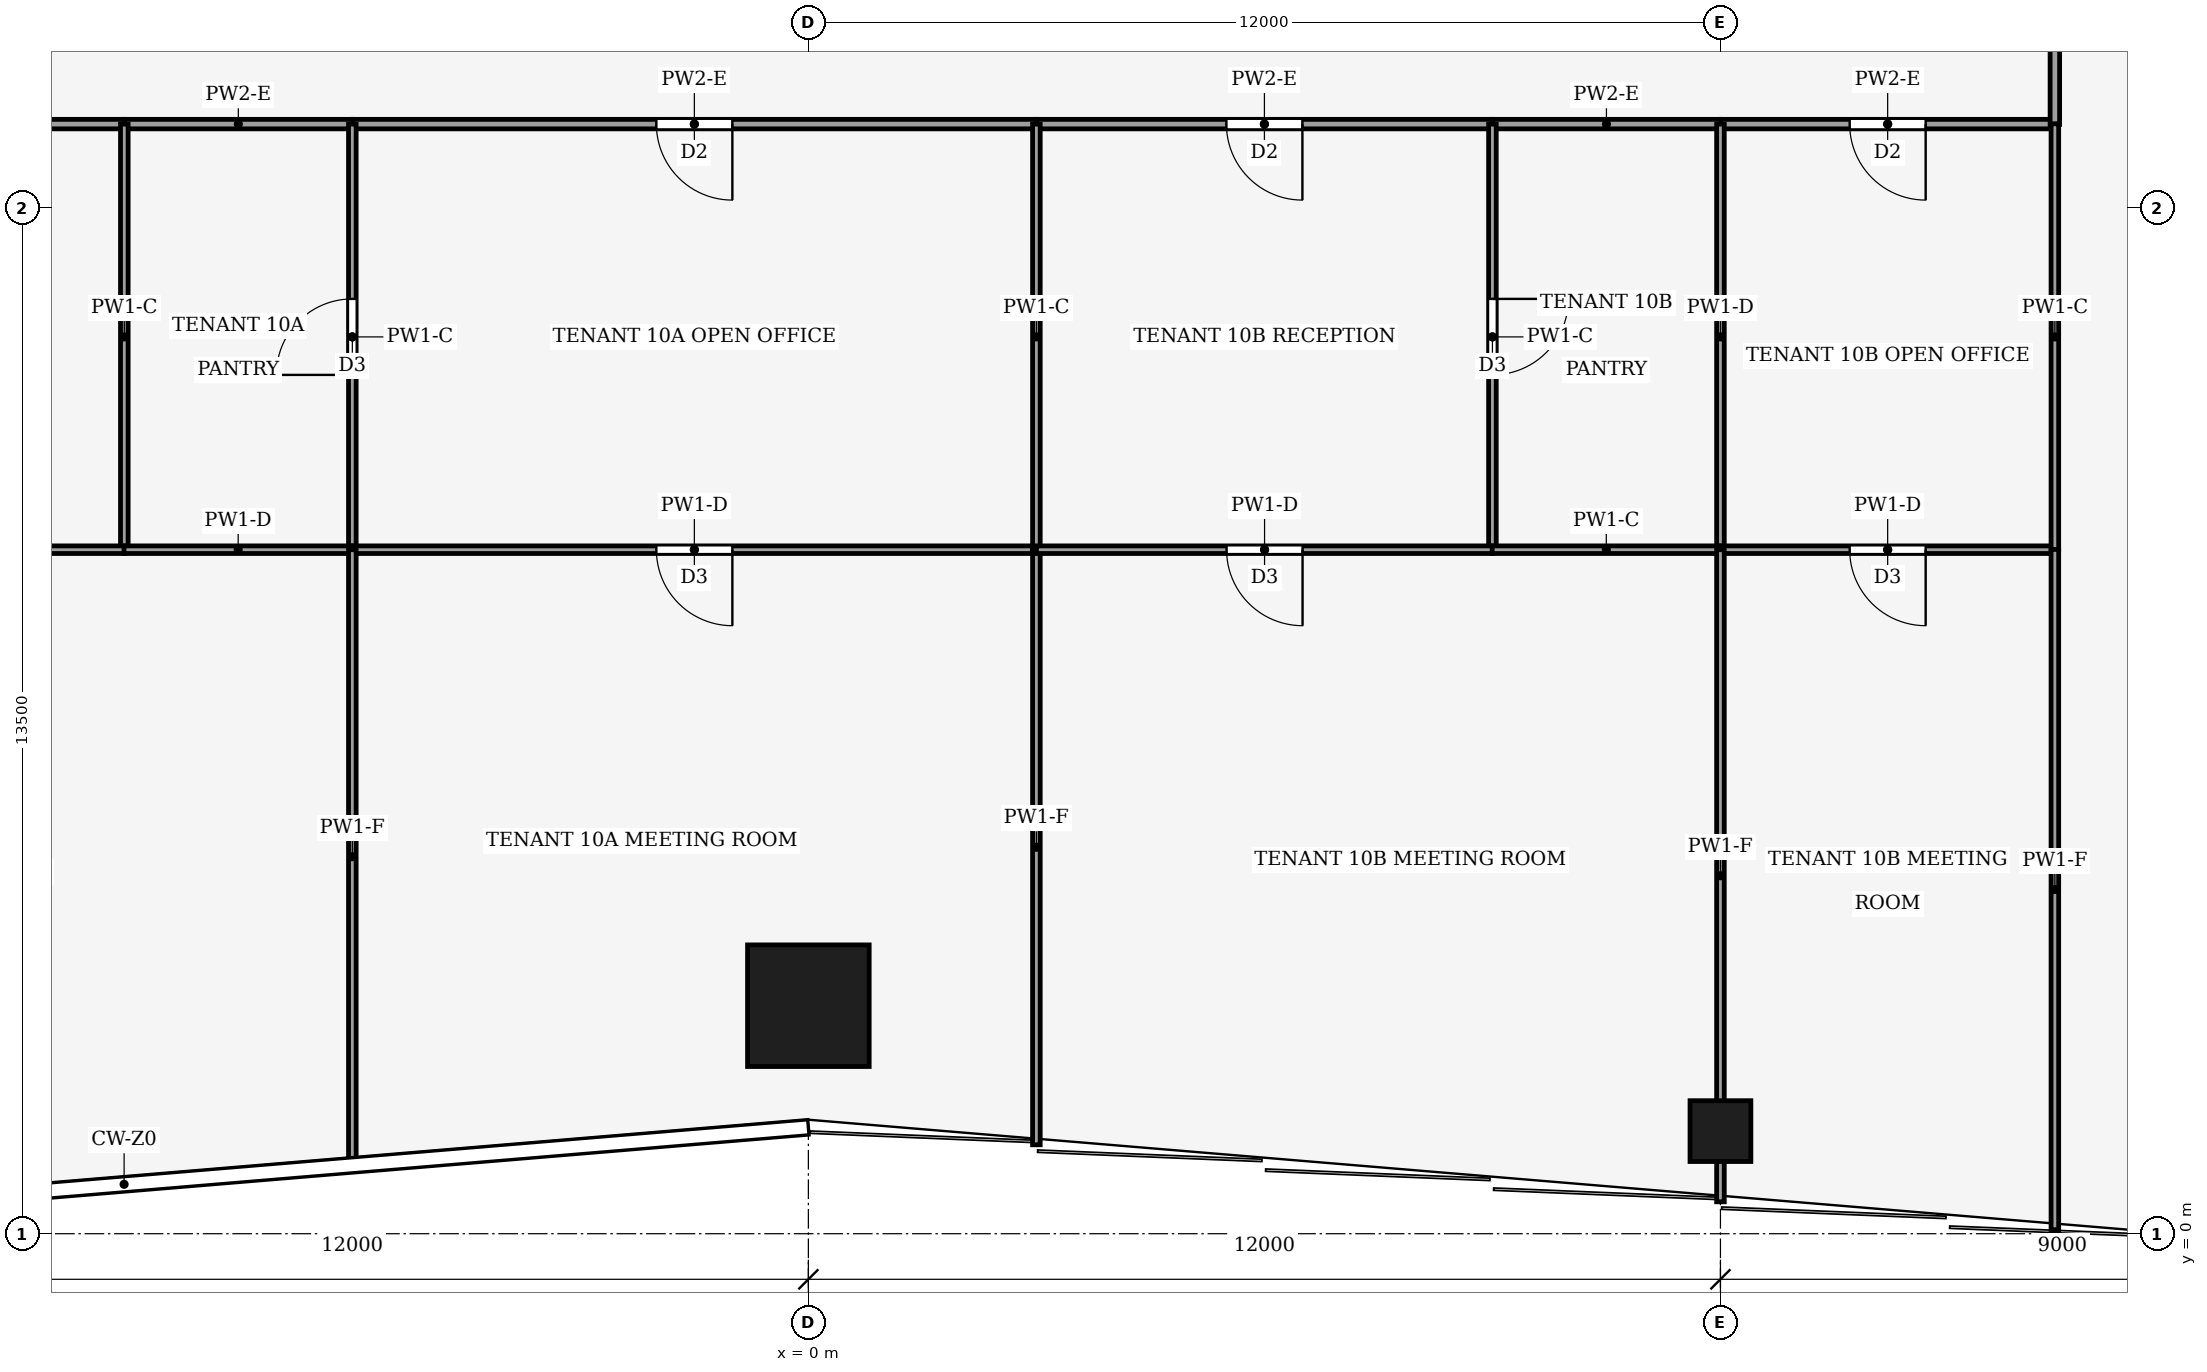
"""IFC4 building model, lengths in metres.
Left out: names, types, materials, properties, quantities, classifications, styles, units other than length and angle.
Written with IfcOpenShell. Run it as: python <this file> out.ifc"""

import sys

from ifc_helpers import new_model, si_unit, direction, frame, frame_2d, origin, origin_2d, place, context, subcontext, project, spatial, rectangle, hollow_rectangle, extrude, element, fill, save


model = new_model("IFC4")
c1 = context("Model", 3, precision=1e-05, world=origin(), true_north=direction((0.0, 1.0)))
c2 = subcontext(c1, "Body", "Model", "MODEL_VIEW")
j1 = project(units=[si_unit("LENGTHUNIT", "METRE"), si_unit("PLANEANGLEUNIT", "RADIAN")], contexts=[c1])
p1 = place(None, origin())
s1 = spatial("IfcSite", under=j1, at=p1, CompositionType="ELEMENT")
p2 = place(p1, origin())
s2 = spatial("IfcBuilding", under=s1, at=p2, CompositionType="ELEMENT")
p3 = place(p2, frame((0.0, 0.0, 46.0)))
s3 = spatial("IfcBuildingStorey", under=s2, at=p3, CompositionType="ELEMENT", Elevation=46.0)
p4 = place(p3, frame((0.0, 3.0, 0.0), z_axis=(0.0, 0.0, 1.0), x_axis=(1.0, 0.0, 0.0)))
e1 = element("IfcColumn", 1, at=p4, inside=s3, PredefinedType="COLUMN", context=c2, shape_type="SweptSolid", body=[
    extrude(hollow_rectangle(XDim=1.6, YDim=1.6, WallThickness=0.09, at=origin_2d()), origin(), (0.0, 0.0, 1.0), 4.0),
])
p5 = place(p3, frame((12.0, 1.35, 0.0), z_axis=(0.0, 0.0, 1.0), x_axis=(1.0, 0.0, 0.0)))
e2 = element("IfcColumn", 2, at=p5, inside=s3, PredefinedType="COLUMN", context=c2, shape_type="SweptSolid", body=[
    extrude(hollow_rectangle(XDim=0.8, YDim=0.8, WallThickness=0.04, at=origin_2d()), origin(), (0.0, 0.0, 1.0), 4.0),
])
p6 = place(p3, frame((-9.0, 14.6, 0.0), z_axis=(0.0, 0.0, 1.0), x_axis=(-1.0, 0.0, 0.0)))
e3 = element("IfcWall", 3, at=p6, inside=s3, PredefinedType="PARTITIONING", context=c2, shape_type="SweptSolid", body=[
    extrude(rectangle(XDim=7.4, YDim=0.125, at=frame_2d((3.7, 0.0))), origin(), (0.0, 0.0, 1.0), 3.29),
])
p7 = place(p6, frame((3.2, 0.0, 0.0)))
e4 = element("IfcOpeningElement", 4, at=p7, cuts=e3, PredefinedType="OPENING", context=c2, shape_type="SweptSolid", body=[
    extrude(rectangle(XDim=1.0, YDim=2.1, at=frame_2d((0.5, 1.05))), frame((0.0, 0.073, 0.0), z_axis=(0.0, -1.0, 0.0), x_axis=(1.0, 0.0, 0.0)), (0.0, 0.0, 1.0), 0.145),
])
p8 = place(p3, frame((-9.0, 14.6, 0.0), z_axis=(0.0, 0.0, 1.0), x_axis=(1.0, 0.0, 0.0)))
e5 = element("IfcWall", 5, at=p8, inside=s3, PredefinedType="PARTITIONING", context=c2, shape_type="SweptSolid", body=[
    extrude(rectangle(XDim=3.0, YDim=0.125, at=frame_2d((1.5, 0.0))), origin(), (0.0, 0.0, 1.0), 3.29),
])
p9 = place(p3, frame((3.0, 14.6, 0.0), z_axis=(0.0, 0.0, 1.0), x_axis=(-1.0, 0.0, 0.0)))
e6 = element("IfcWall", 6, at=p9, inside=s3, PredefinedType="PARTITIONING", context=c2, shape_type="SweptSolid", body=[
    extrude(rectangle(XDim=9.0, YDim=0.125, at=frame_2d((4.5, 0.0))), origin(), (0.0, 0.0, 1.0), 3.29),
])
p10 = place(p9, frame((4.0, 0.0, 0.0)))
e7 = element("IfcOpeningElement", 7, at=p10, cuts=e6, PredefinedType="OPENING", context=c2, shape_type="SweptSolid", body=[
    extrude(rectangle(XDim=1.0, YDim=2.1, at=frame_2d((0.5, 1.05))), frame((0.0, 0.073, 0.0), z_axis=(0.0, -1.0, 0.0), x_axis=(1.0, 0.0, 0.0)), (0.0, 0.0, 1.0), 0.145),
])
p11 = place(p3, frame((9.0, 14.6, 0.0), z_axis=(0.0, 0.0, 1.0), x_axis=(-1.0, 0.0, 0.0)))
e8 = element("IfcWall", 8, at=p11, inside=s3, PredefinedType="PARTITIONING", context=c2, shape_type="SweptSolid", body=[
    extrude(rectangle(XDim=6.0, YDim=0.125, at=frame_2d((3.0, 0.0))), origin(), (0.0, 0.0, 1.0), 3.29),
])
p12 = place(p11, frame((2.5, 0.0, 0.0)))
e9 = element("IfcOpeningElement", 9, at=p12, cuts=e8, PredefinedType="OPENING", context=c2, shape_type="SweptSolid", body=[
    extrude(rectangle(XDim=1.0, YDim=2.1, at=frame_2d((0.5, 1.05))), frame((0.0, 0.073, 0.0), z_axis=(0.0, -1.0, 0.0), x_axis=(1.0, 0.0, 0.0)), (0.0, 0.0, 1.0), 0.145),
])
p13 = place(p3, frame((9.0, 14.6, 0.0), z_axis=(0.0, 0.0, 1.0), x_axis=(1.0, 0.0, 0.0)))
e10 = element("IfcWall", 10, at=p13, inside=s3, PredefinedType="PARTITIONING", context=c2, shape_type="SweptSolid", body=[
    extrude(rectangle(XDim=3.0, YDim=0.125, at=frame_2d((1.5, 0.0))), origin(), (0.0, 0.0, 1.0), 3.29),
])
p14 = place(p3, frame((16.4, 14.6, 0.0), z_axis=(0.0, 0.0, 1.0), x_axis=(-1.0, 0.0, 0.0)))
e11 = element("IfcWall", 11, at=p14, inside=s3, PredefinedType="PARTITIONING", context=c2, shape_type="SweptSolid", body=[
    extrude(rectangle(XDim=4.4, YDim=0.125, at=frame_2d((2.2, 0.0))), origin(), (0.0, 0.0, 1.0), 3.29),
])
p15 = place(p14, frame((1.7, 0.0, 0.0)))
e12 = element("IfcOpeningElement", 12, at=p15, cuts=e11, PredefinedType="OPENING", context=c2, shape_type="SweptSolid", body=[
    extrude(rectangle(XDim=1.0, YDim=2.1, at=frame_2d((0.5, 1.05))), frame((0.0, 0.073, 0.0), z_axis=(0.0, -1.0, 0.0), x_axis=(1.0, 0.0, 0.0)), (0.0, 0.0, 1.0), 0.145),
])
p16 = place(p3, frame((16.4, 24.0, 0.0), z_axis=(0.0, 0.0, 1.0), x_axis=(0.0, -1.0, 0.0)))
e13 = element("IfcWall", 13, at=p16, inside=s3, PredefinedType="PARTITIONING", context=c2, shape_type="SweptSolid", body=[
    extrude(rectangle(XDim=9.404, YDim=0.125, at=frame_2d((4.702, 0.0))), origin(), (0.0, 0.0, 1.0), 3.14),
])
p17 = place(p16, frame((4.202, 0.0, 0.0)))
e14 = element("IfcOpeningElement", 14, at=p17, cuts=e13, PredefinedType="OPENING", context=c2, shape_type="SweptSolid", body=[
    extrude(rectangle(XDim=1.0, YDim=2.1, at=frame_2d((0.5, 1.05))), frame((0.0, 0.073, 0.0), z_axis=(0.0, -1.0, 0.0), x_axis=(1.0, 0.0, 0.0)), (0.0, 0.0, 1.0), 0.145),
])
p18 = place(p3, frame((-9.0, 9.0, 0.0), z_axis=(0.0, 0.0, 1.0), x_axis=(0.0, 1.0, 0.0)))
e15 = element("IfcWall", 15, at=p18, inside=s3, PredefinedType="PARTITIONING", context=c2, shape_type="SweptSolid", body=[
    extrude(rectangle(XDim=5.6, YDim=0.1, at=frame_2d((2.8, 0.0))), origin(), (0.0, 0.0, 1.0), 3.87),
])
p19 = place(p3, frame((-8.996, 9.0, 0.0), z_axis=(0.0, 0.0, 1.0), x_axis=(-1.0, 0.0, 0.0)))
e16 = element("IfcWall", 16, at=p19, inside=s3, PredefinedType="PARTITIONING", context=c2, shape_type="SweptSolid", body=[
    extrude(rectangle(XDim=7.404, YDim=0.1, at=frame_2d((3.702, 0.0))), origin(), (0.0, 0.0, 1.0), 3.29),
])
p20 = place(p19, frame((3.202, 0.0, 0.0)))
e17 = element("IfcOpeningElement", 17, at=p20, cuts=e16, PredefinedType="OPENING", context=c2, shape_type="SweptSolid", body=[
    extrude(rectangle(XDim=1.0, YDim=2.1, at=frame_2d((0.5, 1.05))), frame((0.0, 0.06, 0.0), z_axis=(0.0, -1.0, 0.0), x_axis=(1.0, 0.0, 0.0)), (0.0, 0.0, 1.0), 0.12),
])
p21 = place(p3, frame((-6.0, 9.0, 0.0), z_axis=(0.0, 0.0, 1.0), x_axis=(0.0, 1.0, 0.0)))
e18 = element("IfcWall", 18, at=p21, inside=s3, PredefinedType="PARTITIONING", context=c2, shape_type="SweptSolid", body=[
    extrude(rectangle(XDim=5.6, YDim=0.1, at=frame_2d((2.8, 0.0))), origin(), (0.0, 0.0, 1.0), 3.87),
])
p22 = place(p21, frame((2.3, 0.0, 0.0)))
e19 = element("IfcOpeningElement", 19, at=p22, cuts=e18, PredefinedType="OPENING", context=c2, shape_type="SweptSolid", body=[
    extrude(rectangle(XDim=1.0, YDim=2.1, at=frame_2d((0.5, 1.05))), frame((0.0, 0.06, 0.0), z_axis=(0.0, -1.0, 0.0), x_axis=(1.0, 0.0, 0.0)), (0.0, 0.0, 1.0), 0.12),
])
p23 = place(p3, frame((-9.004, 9.0, 0.0), z_axis=(0.0, 0.0, 1.0), x_axis=(1.0, 0.0, 0.0)))
e20 = element("IfcWall", 20, at=p23, inside=s3, PredefinedType="PARTITIONING", context=c2, shape_type="SweptSolid", body=[
    extrude(rectangle(XDim=3.004, YDim=0.1, at=frame_2d((1.502, 0.0))), origin(), (0.0, 0.0, 1.0), 3.29),
])
p24 = place(p3, frame((3.0, 9.0, 0.0), z_axis=(0.0, 0.0, 1.0), x_axis=(-1.0, 0.0, 0.0)))
e21 = element("IfcWall", 21, at=p24, inside=s3, PredefinedType="PARTITIONING", context=c2, shape_type="SweptSolid", body=[
    extrude(rectangle(XDim=9.0, YDim=0.1, at=frame_2d((4.5, 0.0))), origin(), (0.0, 0.0, 1.0), 3.29),
])
p25 = place(p24, frame((4.0, 0.0, 0.0)))
e22 = element("IfcOpeningElement", 22, at=p25, cuts=e21, PredefinedType="OPENING", context=c2, shape_type="SweptSolid", body=[
    extrude(rectangle(XDim=1.0, YDim=2.1, at=frame_2d((0.5, 1.05))), frame((0.0, 0.06, 0.0), z_axis=(0.0, -1.0, 0.0), x_axis=(1.0, 0.0, 0.0)), (0.0, 0.0, 1.0), 0.12),
])
p26 = place(p3, frame((3.0, 9.0, 0.0), z_axis=(0.0, 0.0, 1.0), x_axis=(0.0, 1.0, 0.0)))
e23 = element("IfcWall", 23, at=p26, inside=s3, PredefinedType="PARTITIONING", context=c2, shape_type="SweptSolid", body=[
    extrude(rectangle(XDim=5.6, YDim=0.1, at=frame_2d((2.8, 0.0))), origin(), (0.0, 0.0, 1.0), 3.87),
])
p27 = place(p3, frame((-6.0, 0.92, 0.0), z_axis=(0.0, 0.0, 1.0), x_axis=(0.0, 1.0, 0.0)))
e24 = element("IfcWall", 24, at=p27, inside=s3, PredefinedType="PARTITIONING", context=c2, shape_type="SweptSolid", body=[
    extrude(rectangle(XDim=8.08, YDim=0.1, at=frame_2d((4.04, 0.0))), origin(), (0.0, 0.0, 1.0), 3.04),
])
p28 = place(p3, frame((3.0, 1.17, 0.0), z_axis=(0.0, 0.0, 1.0), x_axis=(0.0, 1.0, 0.0)))
e25 = element("IfcWall", 25, at=p28, inside=s3, PredefinedType="PARTITIONING", context=c2, shape_type="SweptSolid", body=[
    extrude(rectangle(XDim=7.83, YDim=0.1, at=frame_2d((3.915, 0.0))), origin(), (0.0, 0.0, 1.0), 3.04),
])
p29 = place(p3, frame((9.0, 14.6, 0.0), z_axis=(0.0, 0.0, 1.0), x_axis=(0.0, -1.0, 0.0)))
e26 = element("IfcWall", 26, at=p29, inside=s3, PredefinedType="PARTITIONING", context=c2, shape_type="SweptSolid", body=[
    extrude(rectangle(XDim=5.6, YDim=0.1, at=frame_2d((2.8, 0.0))), origin(), (0.0, 0.0, 1.0), 3.87),
])
p30 = place(p29, frame((2.3, 0.0, 0.0)))
e27 = element("IfcOpeningElement", 27, at=p30, cuts=e26, PredefinedType="OPENING", context=c2, shape_type="SweptSolid", body=[
    extrude(rectangle(XDim=1.0, YDim=2.1, at=frame_2d((0.5, 1.05))), frame((0.0, 0.06, 0.0), z_axis=(0.0, -1.0, 0.0), x_axis=(1.0, 0.0, 0.0)), (0.0, 0.0, 1.0), 0.12),
])
p31 = place(p3, frame((9.004, 9.0, 0.0), z_axis=(0.0, 0.0, 1.0), x_axis=(-1.0, 0.0, 0.0)))
e28 = element("IfcWall", 28, at=p31, inside=s3, PredefinedType="PARTITIONING", context=c2, shape_type="SweptSolid", body=[
    extrude(rectangle(XDim=6.004, YDim=0.1, at=frame_2d((3.002, 0.0))), origin(), (0.0, 0.0, 1.0), 3.29),
])
p32 = place(p31, frame((2.502, 0.0, 0.0)))
e29 = element("IfcOpeningElement", 29, at=p32, cuts=e28, PredefinedType="OPENING", context=c2, shape_type="SweptSolid", body=[
    extrude(rectangle(XDim=1.0, YDim=2.1, at=frame_2d((0.5, 1.05))), frame((0.0, 0.06, 0.0), z_axis=(0.0, -1.0, 0.0), x_axis=(1.0, 0.0, 0.0)), (0.0, 0.0, 1.0), 0.12),
])
p33 = place(p3, frame((12.0, 9.0, 0.0), z_axis=(0.0, 0.0, 1.0), x_axis=(0.0, 1.0, 0.0)))
e30 = element("IfcWall", 30, at=p33, inside=s3, PredefinedType="PARTITIONING", context=c2, shape_type="SweptSolid", body=[
    extrude(rectangle(XDim=5.6, YDim=0.1, at=frame_2d((2.8, 0.0))), origin(), (0.0, 0.0, 1.0), 3.29),
])
p34 = place(p3, frame((8.996, 9.0, 0.0), z_axis=(0.0, 0.0, 1.0), x_axis=(1.0, 0.0, 0.0)))
e31 = element("IfcWall", 31, at=p34, inside=s3, PredefinedType="PARTITIONING", context=c2, shape_type="SweptSolid", body=[
    extrude(rectangle(XDim=3.004, YDim=0.1, at=frame_2d((1.502, 0.0))), origin(), (0.0, 0.0, 1.0), 3.87),
])
p35 = place(p3, frame((16.4, 9.0, 0.0), z_axis=(0.0, 0.0, 1.0), x_axis=(-1.0, 0.0, 0.0)))
e32 = element("IfcWall", 32, at=p35, inside=s3, PredefinedType="PARTITIONING", context=c2, shape_type="SweptSolid", body=[
    extrude(rectangle(XDim=4.4, YDim=0.1, at=frame_2d((2.2, 0.0))), origin(), (0.0, 0.0, 1.0), 3.29),
])
p36 = place(p35, frame((1.7, 0.0, 0.0)))
e33 = element("IfcOpeningElement", 33, at=p36, cuts=e32, PredefinedType="OPENING", context=c2, shape_type="SweptSolid", body=[
    extrude(rectangle(XDim=1.0, YDim=2.1, at=frame_2d((0.5, 1.05))), frame((0.0, 0.06, 0.0), z_axis=(0.0, -1.0, 0.0), x_axis=(1.0, 0.0, 0.0)), (0.0, 0.0, 1.0), 0.12),
])
p37 = place(p3, frame((16.4, 8.996, 0.0), z_axis=(0.0, 0.0, 1.0), x_axis=(0.0, 1.0, 0.0)))
e34 = element("IfcWall", 34, at=p37, inside=s3, PredefinedType="PARTITIONING", context=c2, shape_type="SweptSolid", body=[
    extrude(rectangle(XDim=5.608, YDim=0.1, at=frame_2d((2.804, 0.0))), origin(), (0.0, 0.0, 1.0), 3.87),
])
p38 = place(p3, frame((12.0, 0.42, 0.0), z_axis=(0.0, 0.0, 1.0), x_axis=(0.0, 1.0, 0.0)))
e35 = element("IfcWall", 35, at=p38, inside=s3, PredefinedType="PARTITIONING", context=c2, shape_type="SweptSolid", body=[
    extrude(rectangle(XDim=8.58, YDim=0.1, at=frame_2d((4.29, 0.0))), origin(), (0.0, 0.0, 1.0), 3.04),
])
p39 = place(p3, frame((16.4, 0.053, 0.0), z_axis=(0.0, 0.0, 1.0), x_axis=(0.0, 1.0, 0.0)))
e36 = element("IfcWall", 36, at=p39, inside=s3, PredefinedType="PARTITIONING", context=c2, shape_type="SweptSolid", body=[
    extrude(rectangle(XDim=8.951, YDim=0.1, at=frame_2d((4.475, 0.0))), origin(), (0.0, 0.0, 1.0), 3.04),
])
p40 = place(p10, origin())
e37 = element("IfcDoor", 37, at=p40, inside=s3, OperationType="SINGLE_SWING_RIGHT", PredefinedType="DOOR", context=c2, shape_type="SweptSolid", body=[
    extrude(rectangle(XDim=1.0, YDim=2.1, at=frame_2d((0.5, 1.05))), frame((0.0, 0.025, 0.0), z_axis=(0.0, -1.0, 0.0), x_axis=(1.0, 0.0, 0.0)), (0.0, 0.0, 1.0), 0.05),
])
fill(e7, e37)
p41 = place(p12, origin())
e38 = element("IfcDoor", 38, at=p41, inside=s3, OperationType="SINGLE_SWING_LEFT", PredefinedType="DOOR", context=c2, shape_type="SweptSolid", body=[
    extrude(rectangle(XDim=1.0, YDim=2.1, at=frame_2d((0.5, 1.05))), frame((0.0, 0.025, 0.0), z_axis=(0.0, -1.0, 0.0), x_axis=(1.0, 0.0, 0.0)), (0.0, 0.0, 1.0), 0.05),
])
fill(e9, e38)
p42 = place(p15, origin())
e39 = element("IfcDoor", 39, at=p42, inside=s3, OperationType="SINGLE_SWING_RIGHT", PredefinedType="DOOR", context=c2, shape_type="SweptSolid", body=[
    extrude(rectangle(XDim=1.0, YDim=2.1, at=frame_2d((0.5, 1.05))), frame((0.0, 0.025, 0.0), z_axis=(0.0, -1.0, 0.0), x_axis=(1.0, 0.0, 0.0)), (0.0, 0.0, 1.0), 0.05),
])
fill(e12, e39)
p43 = place(p22, origin())
e40 = element("IfcDoor", 40, at=p43, inside=s3, OperationType="SINGLE_SWING_RIGHT", PredefinedType="DOOR", context=c2, shape_type="SweptSolid", body=[
    extrude(rectangle(XDim=1.0, YDim=2.1, at=frame_2d((0.5, 1.05))), frame((0.0, 0.025, 0.0), z_axis=(0.0, -1.0, 0.0), x_axis=(1.0, 0.0, 0.0)), (0.0, 0.0, 1.0), 0.05),
])
fill(e19, e40)
p44 = place(p25, origin())
e41 = element("IfcDoor", 41, at=p44, inside=s3, OperationType="SINGLE_SWING_LEFT", PredefinedType="DOOR", context=c2, shape_type="SweptSolid", body=[
    extrude(rectangle(XDim=1.0, YDim=2.1, at=frame_2d((0.5, 1.05))), frame((0.0, 0.025, 0.0), z_axis=(0.0, -1.0, 0.0), x_axis=(1.0, 0.0, 0.0)), (0.0, 0.0, 1.0), 0.05),
])
fill(e22, e41)
p45 = place(p30, origin())
e42 = element("IfcDoor", 42, at=p45, inside=s3, OperationType="SINGLE_SWING_RIGHT", PredefinedType="DOOR", context=c2, shape_type="SweptSolid", body=[
    extrude(rectangle(XDim=1.0, YDim=2.1, at=frame_2d((0.5, 1.05))), frame((0.0, 0.025, 0.0), z_axis=(0.0, -1.0, 0.0), x_axis=(1.0, 0.0, 0.0)), (0.0, 0.0, 1.0), 0.05),
])
fill(e27, e42)
p46 = place(p32, origin())
e43 = element("IfcDoor", 43, at=p46, inside=s3, OperationType="SINGLE_SWING_LEFT", PredefinedType="DOOR", context=c2, shape_type="SweptSolid", body=[
    extrude(rectangle(XDim=1.0, YDim=2.1, at=frame_2d((0.5, 1.05))), frame((0.0, 0.025, 0.0), z_axis=(0.0, -1.0, 0.0), x_axis=(1.0, 0.0, 0.0)), (0.0, 0.0, 1.0), 0.05),
])
fill(e29, e43)
p47 = place(p36, origin())
e44 = element("IfcDoor", 44, at=p47, inside=s3, OperationType="SINGLE_SWING_RIGHT", PredefinedType="DOOR", context=c2, shape_type="SweptSolid", body=[
    extrude(rectangle(XDim=1.0, YDim=2.1, at=frame_2d((0.5, 1.05))), frame((0.0, 0.025, 0.0), z_axis=(0.0, -1.0, 0.0), x_axis=(1.0, 0.0, 0.0)), (0.0, 0.0, 1.0), 0.05),
])
fill(e33, e44)
save(model, sys.argv[1])
